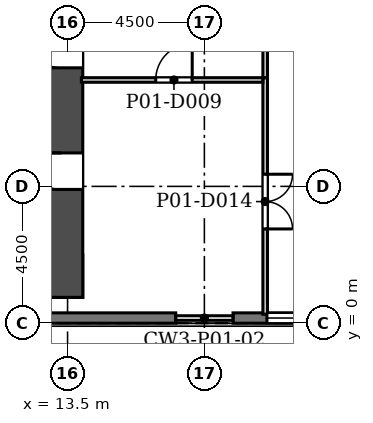
"""IFC4 building model, lengths in metres.
Left out: names, types, materials, properties, quantities, classifications, styles, units other than length and angle.
Written with IfcOpenShell. Run it as: python <this file> out.ifc"""

import sys

from ifc_helpers import new_model, si_unit, direction, frame, frame_2d, origin, place, context, subcontext, project, spatial, rectangle, extrude, element, fill, save


model = new_model("IFC4")
c1 = context("Model", 3, precision=1e-05, world=origin(), true_north=direction((0.0, 1.0)))
c2 = subcontext(c1, "Body", "Model", "MODEL_VIEW")
j1 = project(units=[si_unit("LENGTHUNIT", "METRE"), si_unit("PLANEANGLEUNIT", "RADIAN")], contexts=[c1])
p1 = place(None, origin())
s1 = spatial("IfcSite", under=j1, at=p1, CompositionType="ELEMENT")
p2 = place(p1, origin())
s2 = spatial("IfcBuilding", under=s1, at=p2, CompositionType="ELEMENT")
p3 = place(p2, frame((0.0, 0.0, 8.0)))
s3 = spatial("IfcBuildingStorey", under=s2, at=p3, CompositionType="ELEMENT", Elevation=8.0)
p4 = place(p3, frame((-14.0, 1.55, 0.0), z_axis=(0.0, 0.0, 1.0), x_axis=(1.0, 0.0, 0.0)))
e1 = element("IfcWall", 1, at=p4, inside=s3, PredefinedType="SHEAR", context=c2, shape_type="SweptSolid", body=[
    extrude(rectangle(XDim=28.0, YDim=1.4, at=frame_2d((14.0, 0.0))), origin(), (0.0, 0.0, 1.0), 6.0),
])
p5 = place(p3, frame((13.3, 0.85, 0.0), z_axis=(0.0, 0.0, 1.0), x_axis=(0.0, 1.0, 0.0)))
e2 = element("IfcWall", 2, at=p5, inside=s3, PredefinedType="SHEAR", context=c2, shape_type="SweptSolid", body=[
    extrude(rectangle(XDim=10.202, YDim=1.4, at=frame_2d((5.101, 0.0))), origin(), (0.0, 0.0, 1.0), 6.0),
])
p6 = place(p5, frame((3.55, 0.0, 0.0)))
e3 = element("IfcOpeningElement", 3, at=p6, cuts=e2, PredefinedType="OPENING", context=c2, shape_type="SweptSolid", body=[
    extrude(rectangle(XDim=1.2, YDim=2.1, at=frame_2d((0.6, 1.05))), frame((0.0, 0.71, 0.0), z_axis=(0.0, -1.0, 0.0), x_axis=(1.0, 0.0, 0.0)), (0.0, 0.0, 1.0), 1.42),
])
p7 = place(p5, frame((7.55, 0.0, 0.0)))
e4 = element("IfcOpeningElement", 4, at=p7, cuts=e2, PredefinedType="OPENING", context=c2, shape_type="SweptSolid", body=[
    extrude(rectangle(XDim=1.2, YDim=2.1, at=frame_2d((0.6, 1.05))), frame((0.0, 0.71, 0.0), z_axis=(0.0, -1.0, 0.0), x_axis=(1.0, 0.0, 0.0)), (0.0, 0.0, 1.0), 1.42),
])
p8 = place(p3, frame((-29.058, 0.17, 0.0), z_axis=(0.0, 0.0, 1.0), x_axis=(1.0, 0.0, 0.0)))
e5 = element("IfcWall", 5, at=p8, inside=s3, PredefinedType="SOLIDWALL", context=c2, shape_type="SweptSolid", body=[
    extrude(rectangle(XDim=46.115, YDim=0.34, at=frame_2d((23.058, 0.0))), origin(), (0.0, 0.0, 1.0), 5.7),
])
p9 = place(p8, frame((1.115, 0.0, 0.9)))
e6 = element("IfcOpeningElement", 6, at=p9, cuts=e5, PredefinedType="OPENING", context=c2, shape_type="SweptSolid", body=[
    extrude(rectangle(XDim=1.885, YDim=3.5, at=frame_2d((0.942, 1.75))), frame((0.0, 0.18, 0.0), z_axis=(0.0, -1.0, 0.0), x_axis=(1.0, 0.0, 0.0)), (0.0, 0.0, 1.0), 0.36),
])
p10 = place(p8, frame((4.115, 0.0, 0.9)))
e7 = element("IfcOpeningElement", 7, at=p10, cuts=e5, PredefinedType="OPENING", context=c2, shape_type="SweptSolid", body=[
    extrude(rectangle(XDim=1.885, YDim=3.5, at=frame_2d((0.942, 1.75))), frame((0.0, 0.18, 0.0), z_axis=(0.0, -1.0, 0.0), x_axis=(1.0, 0.0, 0.0)), (0.0, 0.0, 1.0), 0.36),
])
p11 = place(p8, frame((7.115, 0.0, 0.9)))
e8 = element("IfcOpeningElement", 8, at=p11, cuts=e5, PredefinedType="OPENING", context=c2, shape_type="SweptSolid", body=[
    extrude(rectangle(XDim=1.885, YDim=3.5, at=frame_2d((0.942, 1.75))), frame((0.0, 0.18, 0.0), z_axis=(0.0, -1.0, 0.0), x_axis=(1.0, 0.0, 0.0)), (0.0, 0.0, 1.0), 0.36),
])
p12 = place(p8, frame((10.115, 0.0, 0.9)))
e9 = element("IfcOpeningElement", 9, at=p12, cuts=e5, PredefinedType="OPENING", context=c2, shape_type="SweptSolid", body=[
    extrude(rectangle(XDim=1.885, YDim=3.5, at=frame_2d((0.942, 1.75))), frame((0.0, 0.18, 0.0), z_axis=(0.0, -1.0, 0.0), x_axis=(1.0, 0.0, 0.0)), (0.0, 0.0, 1.0), 0.36),
])
p13 = place(p3, frame((18.942, 0.17, 0.0), z_axis=(0.0, 0.0, 1.0), x_axis=(1.0, 0.0, 0.0)))
e10 = element("IfcWall", 10, at=p13, inside=s3, PredefinedType="SOLIDWALL", context=c2, shape_type="SweptSolid", body=[
    extrude(rectangle(XDim=16.115, YDim=0.34, at=frame_2d((8.058, 0.0))), origin(), (0.0, 0.0, 1.0), 5.7),
])
p14 = place(p13, frame((1.115, 0.0, 0.9)))
e11 = element("IfcOpeningElement", 11, at=p14, cuts=e10, PredefinedType="OPENING", context=c2, shape_type="SweptSolid", body=[
    extrude(rectangle(XDim=1.885, YDim=3.5, at=frame_2d((0.942, 1.75))), frame((0.0, 0.18, 0.0), z_axis=(0.0, -1.0, 0.0), x_axis=(1.0, 0.0, 0.0)), (0.0, 0.0, 1.0), 0.36),
])
p15 = place(p13, frame((4.115, 0.0, 0.9)))
e12 = element("IfcOpeningElement", 12, at=p15, cuts=e10, PredefinedType="OPENING", context=c2, shape_type="SweptSolid", body=[
    extrude(rectangle(XDim=1.885, YDim=3.5, at=frame_2d((0.942, 1.75))), frame((0.0, 0.18, 0.0), z_axis=(0.0, -1.0, 0.0), x_axis=(1.0, 0.0, 0.0)), (0.0, 0.0, 1.0), 0.36),
])
p16 = place(p13, frame((7.115, 0.0, 0.9)))
e13 = element("IfcOpeningElement", 13, at=p16, cuts=e10, PredefinedType="OPENING", context=c2, shape_type="SweptSolid", body=[
    extrude(rectangle(XDim=1.885, YDim=3.5, at=frame_2d((0.942, 1.75))), frame((0.0, 0.18, 0.0), z_axis=(0.0, -1.0, 0.0), x_axis=(1.0, 0.0, 0.0)), (0.0, 0.0, 1.0), 0.36),
])
p17 = place(p13, frame((10.115, 0.0, 0.9)))
e14 = element("IfcOpeningElement", 14, at=p17, cuts=e10, PredefinedType="OPENING", context=c2, shape_type="SweptSolid", body=[
    extrude(rectangle(XDim=1.885, YDim=3.5, at=frame_2d((0.942, 1.75))), frame((0.0, 0.18, 0.0), z_axis=(0.0, -1.0, 0.0), x_axis=(1.0, 0.0, 0.0)), (0.0, 0.0, 1.0), 0.36),
])
p18 = place(p13, frame((13.115, 0.0, 0.9)))
e15 = element("IfcOpeningElement", 15, at=p18, cuts=e10, PredefinedType="OPENING", context=c2, shape_type="SweptSolid", body=[
    extrude(rectangle(XDim=1.885, YDim=3.5, at=frame_2d((0.942, 1.75))), frame((0.0, 0.18, 0.0), z_axis=(0.0, -1.0, 0.0), x_axis=(1.0, 0.0, 0.0)), (0.0, 0.0, 1.0), 0.36),
])
p19 = place(p3, frame((20.0, 0.295, 0.0), z_axis=(0.0, 0.0, 1.0), x_axis=(0.0, 1.0, 0.0)))
e16 = element("IfcWall", 16, at=p19, inside=s3, PredefinedType="PARTITIONING", context=c2, shape_type="SweptSolid", body=[
    extrude(rectangle(XDim=7.78, YDim=0.15, at=frame_2d((3.89, 0.0))), origin(), (0.0, 0.0, 1.0), 5.7),
])
p20 = place(p19, frame((2.805, 0.0, 0.0)))
e17 = element("IfcOpeningElement", 17, at=p20, cuts=e16, PredefinedType="OPENING", context=c2, shape_type="SweptSolid", body=[
    extrude(rectangle(XDim=1.8, YDim=2.1, at=frame_2d((0.9, 1.05))), frame((0.0, 0.085, 0.0), z_axis=(0.0, -1.0, 0.0), x_axis=(1.0, 0.0, 0.0)), (0.0, 0.0, 1.0), 0.17),
])
p21 = place(p3, frame((13.955, 8.0, 0.0), z_axis=(0.0, 0.0, 1.0), x_axis=(1.0, 0.0, 0.0)))
e18 = element("IfcWall", 18, at=p21, inside=s3, PredefinedType="PARTITIONING", context=c2, shape_type="SweptSolid", body=[
    extrude(rectangle(XDim=5.97, YDim=0.15, at=frame_2d((2.985, 0.0))), origin(), (0.0, 0.0, 1.0), 5.7),
])
p22 = place(p21, frame((2.445, 0.0, 0.0)))
e19 = element("IfcOpeningElement", 19, at=p22, cuts=e18, PredefinedType="OPENING", context=c2, shape_type="SweptSolid", body=[
    extrude(rectangle(XDim=1.2, YDim=2.1, at=frame_2d((0.6, 1.05))), frame((0.0, 0.085, 0.0), z_axis=(0.0, -1.0, 0.0), x_axis=(1.0, 0.0, 0.0)), (0.0, 0.0, 1.0), 0.17),
])
p23 = place(p3, frame((20.0, 8.075, 0.0), z_axis=(0.0, 0.0, 1.0), x_axis=(0.0, 1.0, 0.0)))
e20 = element("IfcWall", 20, at=p23, inside=s3, PredefinedType="PARTITIONING", context=c2, shape_type="SweptSolid", body=[
    extrude(rectangle(XDim=1.85, YDim=0.15, at=frame_2d((0.925, 0.0))), origin(), (0.0, 0.0, 1.0), 5.7),
])
p24 = place(p14, origin())
e21 = element("IfcWindow", 21, at=p24, inside=s3, PartitioningType="SINGLE_PANEL", PredefinedType="WINDOW", context=c2, shape_type="SweptSolid", body=[
    extrude(rectangle(XDim=1.885, YDim=3.5, at=frame_2d((0.942, 1.75))), frame((0.0, 0.11, 0.0), z_axis=(0.0, -1.0, 0.0), x_axis=(1.0, 0.0, 0.0)), (0.0, 0.0, 1.0), 0.06),
])
fill(e11, e21)
p25 = place(p6, origin())
e22 = element("IfcDoor", 22, at=p25, inside=s3, OperationType="SINGLE_SWING_RIGHT", PredefinedType="DOOR", context=c2, shape_type="SweptSolid", body=[
    extrude(rectangle(XDim=1.2, YDim=2.1, at=frame_2d((0.6, 1.05))), frame((0.0, 0.025, 0.0), z_axis=(0.0, -1.0, 0.0), x_axis=(1.0, 0.0, 0.0)), (0.0, 0.0, 1.0), 0.05),
])
fill(e3, e22)
p26 = place(p7, origin())
e23 = element("IfcDoor", 23, at=p26, inside=s3, OperationType="SINGLE_SWING_RIGHT", PredefinedType="DOOR", context=c2, shape_type="SweptSolid", body=[
    extrude(rectangle(XDim=1.2, YDim=2.1, at=frame_2d((0.6, 1.05))), frame((0.0, 0.025, 0.0), z_axis=(0.0, -1.0, 0.0), x_axis=(1.0, 0.0, 0.0)), (0.0, 0.0, 1.0), 0.05),
])
fill(e4, e23)
p27 = place(p22, origin())
e24 = element("IfcDoor", 24, at=p27, inside=s3, OperationType="SINGLE_SWING_RIGHT", PredefinedType="DOOR", context=c2, shape_type="SweptSolid", body=[
    extrude(rectangle(XDim=1.2, YDim=2.1, at=frame_2d((0.6, 1.05))), frame((0.0, 0.025, 0.0), z_axis=(0.0, -1.0, 0.0), x_axis=(1.0, 0.0, 0.0)), (0.0, 0.0, 1.0), 0.05),
])
fill(e19, e24)
p28 = place(p20, frame((1.8, 0.0, 0.0), z_axis=(0.0, 0.0, 1.0), x_axis=(-1.0, 0.0, 0.0)))
e25 = element("IfcDoor", 25, at=p28, inside=s3, OperationType="DOUBLE_DOOR_SINGLE_SWING", PredefinedType="DOOR", context=c2, shape_type="SweptSolid", body=[
    extrude(rectangle(XDim=1.8, YDim=2.1, at=frame_2d((0.9, 1.05))), frame((0.0, 0.025, 0.0), z_axis=(0.0, -1.0, 0.0), x_axis=(1.0, 0.0, 0.0)), (0.0, 0.0, 1.0), 0.05),
])
fill(e17, e25)
save(model, sys.argv[1])
